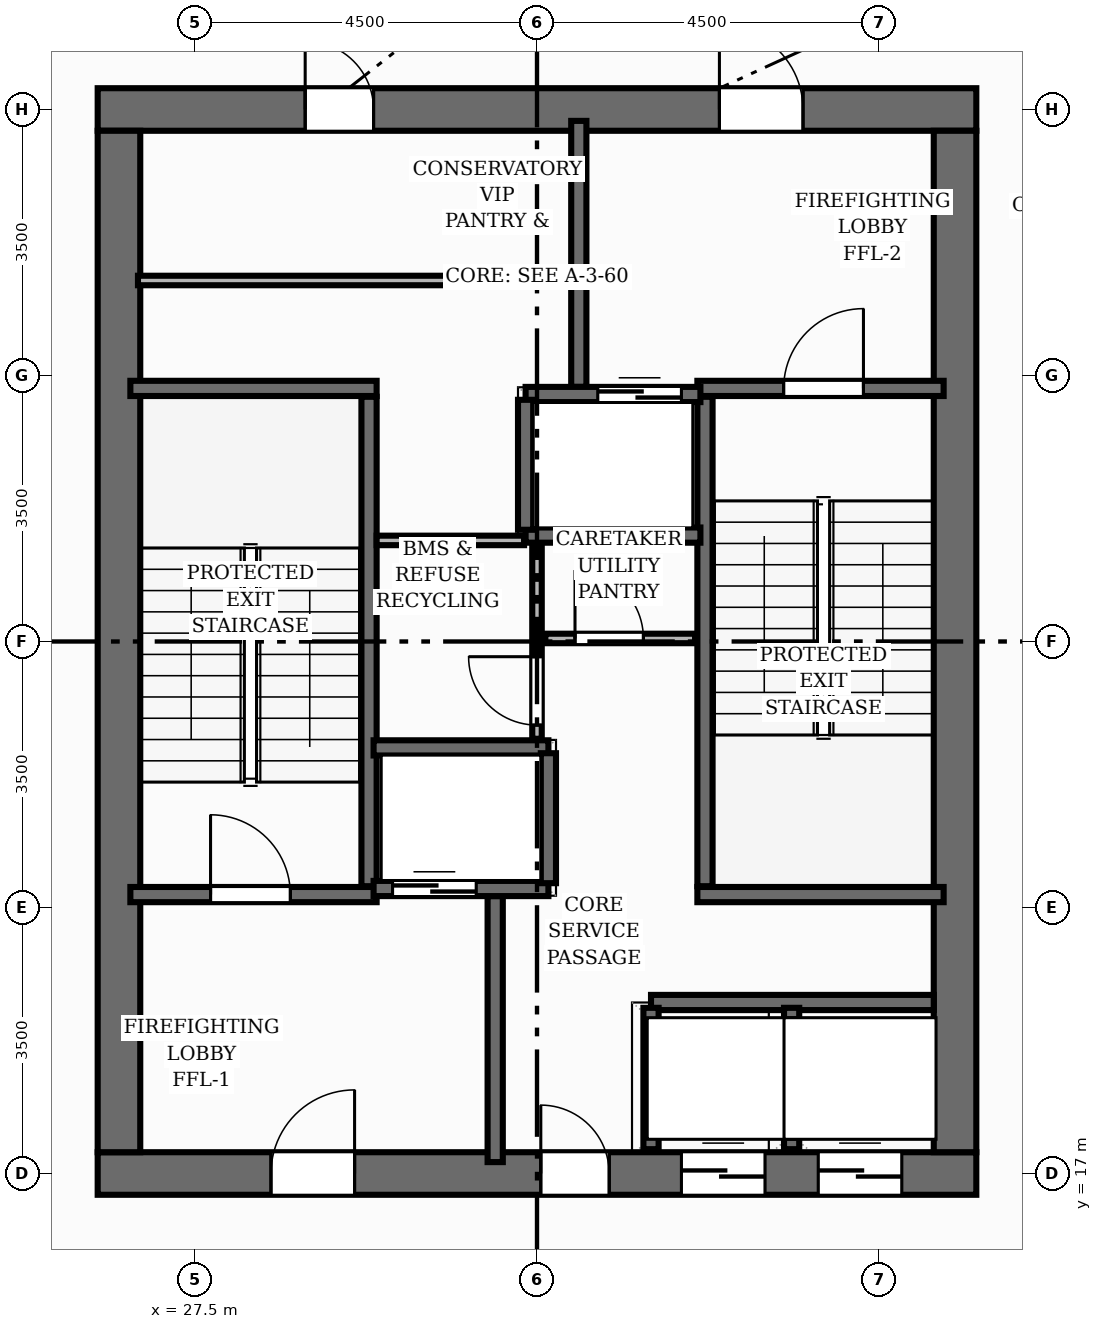
"""IFC4 building model, lengths in metres.
Left out: names, types, materials, properties, quantities, classifications, styles, units other than length and angle.
Written with IfcOpenShell. Run it as: python <this file> out.ifc"""

import sys

from ifc_helpers import new_model, si_unit, direction, frame, frame_2d, origin, place, context, subcontext, project, spatial, rectangle, extrude, element, fill, save


model = new_model("IFC4")
c1 = context("Model", 3, precision=1e-05, world=origin(), true_north=direction((0.0, 1.0)))
c2 = subcontext(c1, "Body", "Model", "MODEL_VIEW")
j1 = project(units=[si_unit("LENGTHUNIT", "METRE"), si_unit("PLANEANGLEUNIT", "RADIAN")], contexts=[c1])
p1 = place(None, origin())
s1 = spatial("IfcSite", under=j1, at=p1, CompositionType="ELEMENT")
p2 = place(p1, origin())
s2 = spatial("IfcBuilding", under=s1, at=p2, CompositionType="ELEMENT")
p3 = place(p2, frame((0.0, 0.0, 246.88)))
s3 = spatial("IfcBuildingStorey", under=s2, at=p3, CompositionType="ELEMENT", Elevation=246.88)
p4 = place(p3, frame((26.22, 17.0, 0.0), z_axis=(0.0, 0.0, 1.0), x_axis=(1.0, 0.0, 0.0)))
e1 = element("IfcWall", 1, at=p4, inside=s3, PredefinedType="SHEAR", context=c2, shape_type="SweptSolid", body=[
    extrude(rectangle(XDim=11.56, YDim=0.56, at=frame_2d((5.78, 0.0))), origin(), (0.0, 0.0, 1.0), 4.16),
])
p5 = place(p4, frame((2.28, 0.0, 0.0)))
e2 = element("IfcOpeningElement", 2, at=p5, cuts=e1, PredefinedType="OPENING", context=c2, shape_type="SweptSolid", body=[
    extrude(rectangle(XDim=1.1, YDim=2.15, at=frame_2d((0.55, 1.075))), frame((0.0, 0.29, 0.0), z_axis=(0.0, -1.0, 0.0), x_axis=(1.0, 0.0, 0.0)), (0.0, 0.0, 1.0), 0.58),
])
p6 = place(p4, frame((7.68, 0.0, 0.0)))
e3 = element("IfcOpeningElement", 3, at=p6, cuts=e1, PredefinedType="OPENING", context=c2, shape_type="SweptSolid", body=[
    extrude(rectangle(XDim=1.1, YDim=2.15, at=frame_2d((0.55, 1.075))), frame((0.0, 0.29, 0.0), z_axis=(0.0, -1.0, 0.0), x_axis=(1.0, 0.0, 0.0)), (0.0, 0.0, 1.0), 0.58),
])
p7 = place(p4, frame((9.48, 0.0, 0.0)))
e4 = element("IfcOpeningElement", 4, at=p7, cuts=e1, PredefinedType="OPENING", context=c2, shape_type="SweptSolid", body=[
    extrude(rectangle(XDim=1.1, YDim=2.15, at=frame_2d((0.55, 1.075))), frame((0.0, 0.29, 0.0), z_axis=(0.0, -1.0, 0.0), x_axis=(1.0, 0.0, 0.0)), (0.0, 0.0, 1.0), 0.58),
])
p8 = place(p4, frame((5.83, 0.0, 0.0)))
e5 = element("IfcOpeningElement", 5, at=p8, cuts=e1, PredefinedType="OPENING", context=c2, shape_type="SweptSolid", body=[
    extrude(rectangle(XDim=0.9, YDim=2.1, at=frame_2d((0.45, 1.05))), frame((0.0, 0.29, 0.0), z_axis=(0.0, -1.0, 0.0), x_axis=(1.0, 0.0, 0.0)), (0.0, 0.0, 1.0), 0.58),
])
p9 = place(p3, frame((26.22, 31.0, 0.0), z_axis=(0.0, 0.0, 1.0), x_axis=(1.0, 0.0, 0.0)))
e6 = element("IfcWall", 6, at=p9, inside=s3, PredefinedType="SHEAR", context=c2, shape_type="SweptSolid", body=[
    extrude(rectangle(XDim=11.56, YDim=0.56, at=frame_2d((5.78, 0.0))), origin(), (0.0, 0.0, 1.0), 4.16),
])
p10 = place(p9, frame((8.18, 0.0, 0.0)))
e7 = element("IfcOpeningElement", 7, at=p10, cuts=e6, PredefinedType="OPENING", context=c2, shape_type="SweptSolid", body=[
    extrude(rectangle(XDim=1.1, YDim=2.0, at=frame_2d((0.55, 1.0))), frame((0.0, 0.29, 0.0), z_axis=(0.0, -1.0, 0.0), x_axis=(1.0, 0.0, 0.0)), (0.0, 0.0, 1.0), 0.58),
])
p11 = place(p9, frame((2.73, 0.0, 0.0)))
e8 = element("IfcOpeningElement", 8, at=p11, cuts=e6, PredefinedType="OPENING", context=c2, shape_type="SweptSolid", body=[
    extrude(rectangle(XDim=0.9, YDim=2.1, at=frame_2d((0.45, 1.05))), frame((0.0, 0.29, 0.0), z_axis=(0.0, -1.0, 0.0), x_axis=(1.0, 0.0, 0.0)), (0.0, 0.0, 1.0), 0.58),
])
for number, where, z_axis, x_axis in (
    (9, (26.5, 17.28, 0.0), (0.0, 0.0, 1.0), (0.0, 1.0, 0.0)),
    (10, (37.5, 17.28, 0.0), (0.0, 0.0, 1.0), (0.0, 1.0, 0.0)),
):
    element("IfcWall", number, at=place(p3, frame(where, z_axis=z_axis, x_axis=x_axis)), inside=s3, PredefinedType="SHEAR", context=c2, shape_type="SweptSolid", body=[
        extrude(rectangle(XDim=13.44, YDim=0.56, at=frame_2d((6.72, 0.0))), origin(), (0.0, 0.0, 1.0), 4.16),
    ])
p12 = place(p3, frame((29.79, 20.78, 0.0), z_axis=(0.0, 0.0, 1.0), x_axis=(0.0, 1.0, 0.0)))
e11 = element("IfcWall", 11, at=p12, inside=s3, PredefinedType="SHEAR", context=c2, shape_type="SweptSolid", body=[
    extrude(rectangle(XDim=6.44, YDim=0.2, at=frame_2d((3.22, 0.0))), origin(), (0.0, 0.0, 1.0), 4.16),
])
p13 = place(p3, frame((26.65, 27.33, 0.0), z_axis=(0.0, 0.0, 1.0), x_axis=(1.0, 0.0, 0.0)))
e12 = element("IfcWall", 12, at=p13, inside=s3, PredefinedType="SHEAR", context=c2, shape_type="SweptSolid", body=[
    extrude(rectangle(XDim=3.24, YDim=0.2, at=frame_2d((1.62, 0.0))), origin(), (0.0, 0.0, 1.0), 4.16),
])
p14 = place(p3, frame((26.65, 20.67, 0.0), z_axis=(0.0, 0.0, 1.0), x_axis=(1.0, 0.0, 0.0)))
e13 = element("IfcWall", 13, at=p14, inside=s3, PredefinedType="SHEAR", context=c2, shape_type="SweptSolid", body=[
    extrude(rectangle(XDim=3.24, YDim=0.2, at=frame_2d((1.62, 0.0))), origin(), (0.0, 0.0, 1.0), 4.16),
])
p15 = place(p14, frame((1.055, 0.0, 0.0)))
e14 = element("IfcOpeningElement", 14, at=p15, cuts=e13, PredefinedType="OPENING", context=c2, shape_type="SweptSolid", body=[
    extrude(rectangle(XDim=1.05, YDim=2.15, at=frame_2d((0.525, 1.075))), frame((0.0, 0.11, 0.0), z_axis=(0.0, -1.0, 0.0), x_axis=(1.0, 0.0, 0.0)), (0.0, 0.0, 1.0), 0.22),
])
p16 = place(p3, frame((34.21, 20.78, 0.0), z_axis=(0.0, 0.0, 1.0), x_axis=(0.0, 1.0, 0.0)))
e15 = element("IfcWall", 15, at=p16, inside=s3, PredefinedType="SHEAR", context=c2, shape_type="SweptSolid", body=[
    extrude(rectangle(XDim=6.44, YDim=0.2, at=frame_2d((3.22, 0.0))), origin(), (0.0, 0.0, 1.0), 4.16),
])
p17 = place(p3, frame((34.11, 20.67, 0.0), z_axis=(0.0, 0.0, 1.0), x_axis=(1.0, 0.0, 0.0)))
e16 = element("IfcWall", 16, at=p17, inside=s3, PredefinedType="SHEAR", context=c2, shape_type="SweptSolid", body=[
    extrude(rectangle(XDim=3.24, YDim=0.2, at=frame_2d((1.62, 0.0))), origin(), (0.0, 0.0, 1.0), 4.16),
])
p18 = place(p3, frame((34.11, 27.33, 0.0), z_axis=(0.0, 0.0, 1.0), x_axis=(1.0, 0.0, 0.0)))
e17 = element("IfcWall", 17, at=p18, inside=s3, PredefinedType="SHEAR", context=c2, shape_type="SweptSolid", body=[
    extrude(rectangle(XDim=3.24, YDim=0.2, at=frame_2d((1.62, 0.0))), origin(), (0.0, 0.0, 1.0), 4.16),
])
p19 = place(p18, frame((1.135, 0.0, 0.0)))
e18 = element("IfcOpeningElement", 18, at=p19, cuts=e17, PredefinedType="OPENING", context=c2, shape_type="SweptSolid", body=[
    extrude(rectangle(XDim=1.05, YDim=2.15, at=frame_2d((0.525, 1.075))), frame((0.0, 0.11, 0.0), z_axis=(0.0, -1.0, 0.0), x_axis=(1.0, 0.0, 0.0)), (0.0, 0.0, 1.0), 0.22),
])
for number, where, z_axis, x_axis in (
    (19, (31.45, 17.15, 0.0), (0.0, 0.0, 1.0), (0.0, 1.0, 0.0)),
    (20, (32.55, 27.35, 0.0), (0.0, 0.0, 1.0), (0.0, 1.0, 0.0)),
):
    element("IfcWall", number, at=place(p3, frame(where, z_axis=z_axis, x_axis=x_axis)), inside=s3, PredefinedType="SHEAR", context=c2, shape_type="SweptSolid", body=[
        extrude(rectangle(XDim=3.5, YDim=0.2, at=frame_2d((1.75, 0.0))), origin(), (0.0, 0.0, 1.0), 4.16),
    ])
p20 = place(p3, frame((29.85, 20.75, 0.0), z_axis=(0.0, 0.0, 1.0), x_axis=(1.0, 0.0, 0.0)))
e21 = element("IfcWall", 21, at=p20, inside=s3, PredefinedType="SHEAR", context=c2, shape_type="SweptSolid", body=[
    extrude(rectangle(XDim=2.3, YDim=0.2, at=frame_2d((1.15, 0.0))), origin(), (0.0, 0.0, 1.0), 4.16),
])
p21 = place(p20, frame((0.25, 0.0, 0.0)))
e22 = element("IfcOpeningElement", 22, at=p21, cuts=e21, PredefinedType="OPENING", context=c2, shape_type="SweptSolid", body=[
    extrude(rectangle(XDim=1.1, YDim=2.15, at=frame_2d((0.55, 1.075))), frame((0.0, 0.11, 0.0), z_axis=(0.0, -1.0, 0.0), x_axis=(1.0, 0.0, 0.0)), (0.0, 0.0, 1.0), 0.22),
])
p22 = place(p3, frame((29.85, 22.6, 0.0), z_axis=(0.0, 0.0, 1.0), x_axis=(1.0, 0.0, 0.0)))
e23 = element("IfcWall", 23, at=p22, inside=s3, PredefinedType="SHEAR", context=c2, shape_type="SweptSolid", body=[
    extrude(rectangle(XDim=2.3, YDim=0.2, at=frame_2d((1.15, 0.0))), origin(), (0.0, 0.0, 1.0), 4.16),
])
p23 = place(p3, frame((32.15, 20.82, 0.0), z_axis=(0.0, 0.0, 1.0), x_axis=(0.0, 1.0, 0.0)))
e24 = element("IfcWall", 24, at=p23, inside=s3, PredefinedType="SHEAR", context=c2, shape_type="SweptSolid", body=[
    extrude(rectangle(XDim=1.71, YDim=0.2, at=frame_2d((0.855, 0.0))), origin(), (0.0, 0.0, 1.0), 4.16),
])
p24 = place(p3, frame((31.85, 27.25, 0.0), z_axis=(0.0, 0.0, 1.0), x_axis=(1.0, 0.0, 0.0)))
e25 = element("IfcWall", 25, at=p24, inside=s3, PredefinedType="SHEAR", context=c2, shape_type="SweptSolid", body=[
    extrude(rectangle(XDim=2.3, YDim=0.2, at=frame_2d((1.15, 0.0))), origin(), (0.0, 0.0, 1.0), 4.16),
])
p25 = place(p24, frame((0.95, 0.0, 0.0)))
e26 = element("IfcOpeningElement", 26, at=p25, cuts=e25, PredefinedType="OPENING", context=c2, shape_type="SweptSolid", body=[
    extrude(rectangle(XDim=1.1, YDim=2.15, at=frame_2d((0.55, 1.075))), frame((0.0, 0.11, 0.0), z_axis=(0.0, -1.0, 0.0), x_axis=(1.0, 0.0, 0.0)), (0.0, 0.0, 1.0), 0.22),
])
p26 = place(p3, frame((31.85, 25.4, 0.0), z_axis=(0.0, 0.0, 1.0), x_axis=(1.0, 0.0, 0.0)))
e27 = element("IfcWall", 27, at=p26, inside=s3, PredefinedType="SHEAR", context=c2, shape_type="SweptSolid", body=[
    extrude(rectangle(XDim=2.3, YDim=0.2, at=frame_2d((1.15, 0.0))), origin(), (0.0, 0.0, 1.0), 4.16),
])
p27 = place(p3, frame((31.85, 25.47, 0.0), z_axis=(0.0, 0.0, 1.0), x_axis=(0.0, 1.0, 0.0)))
e28 = element("IfcWall", 28, at=p27, inside=s3, PredefinedType="SHEAR", context=c2, shape_type="SweptSolid", body=[
    extrude(rectangle(XDim=1.71, YDim=0.2, at=frame_2d((0.855, 0.0))), origin(), (0.0, 0.0, 1.0), 4.16),
])
p28 = place(p3, frame((26.75, 28.75, 0.0), z_axis=(0.0, 0.0, 1.0), x_axis=(1.0, 0.0, 0.0)))
e29 = element("IfcWall", 29, at=p28, inside=s3, PredefinedType="PARTITIONING", context=c2, shape_type="SweptSolid", body=[
    extrude(rectangle(XDim=5.75, YDim=0.125, at=frame_2d((2.875, 0.0))), origin(), (0.0, 0.0, 1.0), 3.835),
])
p29 = place(p3, frame((33.5, 19.25, 0.0), z_axis=(0.0, 0.0, 1.0), x_axis=(1.0, 0.0, 0.0)))
e30 = element("IfcWall", 30, at=p29, inside=s3, PredefinedType="SHEAR", context=c2, shape_type="SweptSolid", body=[
    extrude(rectangle(XDim=3.72, YDim=0.2, at=frame_2d((1.86, 0.0))), origin(), (0.0, 0.0, 1.0), 4.16),
])
for number, where, z_axis, x_axis in (
    (31, (33.5, 17.32, 0.0), (0.0, 0.0, 1.0), (0.0, 1.0, 0.0)),
    (32, (35.35, 17.32, 0.0), (0.0, 0.0, 1.0), (0.0, 1.0, 0.0)),
):
    element("IfcWall", number, at=place(p3, frame(where, z_axis=z_axis, x_axis=x_axis)), inside=s3, PredefinedType="SHEAR", context=c2, shape_type="SweptSolid", body=[
        extrude(rectangle(XDim=1.86, YDim=0.2, at=frame_2d((0.93, 0.0))), origin(), (0.0, 0.0, 1.0), 4.16),
    ])
p30 = place(p3, frame((32.0, 22.72, 0.0), z_axis=(0.0, 0.0, 1.0), x_axis=(0.0, 1.0, 0.0)))
e33 = element("IfcWall", 33, at=p30, inside=s3, PredefinedType="PARTITIONING", context=c2, shape_type="SweptSolid", body=[
    extrude(rectangle(XDim=2.52, YDim=0.125, at=frame_2d((1.26, 0.0))), origin(), (0.0, 0.0, 1.0), 3.835),
])
p31 = place(p30, frame((0.18, 0.0, 0.0)))
e34 = element("IfcOpeningElement", 34, at=p31, cuts=e33, PredefinedType="OPENING", context=c2, shape_type="SweptSolid", body=[
    extrude(rectangle(XDim=0.9, YDim=2.1, at=frame_2d((0.45, 1.05))), frame((0.0, 0.073, 0.0), z_axis=(0.0, -1.0, 0.0), x_axis=(1.0, 0.0, 0.0)), (0.0, 0.0, 1.0), 0.145),
])
p32 = place(p3, frame((32.11, 24.04, 0.0), z_axis=(0.0, 0.0, 1.0), x_axis=(1.0, 0.0, 0.0)))
e35 = element("IfcWall", 35, at=p32, inside=s3, PredefinedType="PARTITIONING", context=c2, shape_type="SweptSolid", body=[
    extrude(rectangle(XDim=1.97, YDim=0.125, at=frame_2d((0.985, 0.0))), origin(), (0.0, 0.0, 1.0), 3.835),
])
p33 = place(p32, frame((0.39, 0.0, 0.0)))
e36 = element("IfcOpeningElement", 36, at=p33, cuts=e35, PredefinedType="OPENING", context=c2, shape_type="SweptSolid", body=[
    extrude(rectangle(XDim=0.9, YDim=2.1, at=frame_2d((0.45, 1.05))), frame((0.0, 0.073, 0.0), z_axis=(0.0, -1.0, 0.0), x_axis=(1.0, 0.0, 0.0)), (0.0, 0.0, 1.0), 0.145),
])
p34 = place(p3, frame((29.89, 25.33, 0.0), z_axis=(0.0, 0.0, 1.0), x_axis=(1.0, 0.0, 0.0)))
e37 = element("IfcWall", 37, at=p34, inside=s3, PredefinedType="PARTITIONING", context=c2, shape_type="SweptSolid", body=[
    extrude(rectangle(XDim=1.94, YDim=0.125, at=frame_2d((0.97, 0.0))), origin(), (0.0, 0.0, 1.0), 3.835),
])
p35 = place(p15, origin())
e38 = element("IfcDoor", 38, at=p35, inside=s3, OperationType="SINGLE_SWING_LEFT", PredefinedType="DOOR", context=c2, shape_type="SweptSolid", body=[
    extrude(rectangle(XDim=1.05, YDim=2.15, at=frame_2d((0.525, 1.075))), frame((0.0, 0.025, 0.0), z_axis=(0.0, -1.0, 0.0), x_axis=(1.0, 0.0, 0.0)), (0.0, 0.0, 1.0), 0.05),
])
fill(e14, e38)
p36 = place(p19, origin())
e39 = element("IfcDoor", 39, at=p36, inside=s3, OperationType="SINGLE_SWING_RIGHT", PredefinedType="DOOR", context=c2, shape_type="SweptSolid", body=[
    extrude(rectangle(XDim=1.05, YDim=2.15, at=frame_2d((0.525, 1.075))), frame((0.0, 0.025, 0.0), z_axis=(0.0, -1.0, 0.0), x_axis=(1.0, 0.0, 0.0)), (0.0, 0.0, 1.0), 0.05),
])
fill(e18, e39)
p37 = place(p5, origin())
e40 = element("IfcDoor", 40, at=p37, inside=s3, OperationType="SINGLE_SWING_RIGHT", PredefinedType="DOOR", context=c2, shape_type="SweptSolid", body=[
    extrude(rectangle(XDim=1.1, YDim=2.15, at=frame_2d((0.55, 1.075))), frame((0.0, 0.025, 0.0), z_axis=(0.0, -1.0, 0.0), x_axis=(1.0, 0.0, 0.0)), (0.0, 0.0, 1.0), 0.05),
])
fill(e2, e40)
p38 = place(p10, origin())
e41 = element("IfcDoor", 41, at=p38, inside=s3, OperationType="SINGLE_SWING_LEFT", PredefinedType="DOOR", context=c2, shape_type="SweptSolid", body=[
    extrude(rectangle(XDim=1.1, YDim=2.0, at=frame_2d((0.55, 1.0))), frame((0.0, 0.025, 0.0), z_axis=(0.0, -1.0, 0.0), x_axis=(1.0, 0.0, 0.0)), (0.0, 0.0, 1.0), 0.05),
])
fill(e7, e41)
p39 = place(p21, origin())
e42 = element("IfcDoor", 42, at=p39, inside=s3, OperationType="DOUBLE_DOOR_SLIDING", PredefinedType="DOOR", context=c2, shape_type="SweptSolid", body=[
    extrude(rectangle(XDim=1.1, YDim=2.15, at=frame_2d((0.55, 1.075))), frame((0.0, 0.025, 0.0), z_axis=(0.0, -1.0, 0.0), x_axis=(1.0, 0.0, 0.0)), (0.0, 0.0, 1.0), 0.05),
])
fill(e22, e42)
p40 = place(p25, origin())
e43 = element("IfcDoor", 43, at=p40, inside=s3, OperationType="DOUBLE_DOOR_SLIDING", PredefinedType="DOOR", context=c2, shape_type="SweptSolid", body=[
    extrude(rectangle(XDim=1.1, YDim=2.15, at=frame_2d((0.55, 1.075))), frame((0.0, 0.025, 0.0), z_axis=(0.0, -1.0, 0.0), x_axis=(1.0, 0.0, 0.0)), (0.0, 0.0, 1.0), 0.05),
])
fill(e26, e43)
p41 = place(p6, origin())
e44 = element("IfcDoor", 44, at=p41, inside=s3, OperationType="DOUBLE_DOOR_SLIDING", PredefinedType="DOOR", context=c2, shape_type="SweptSolid", body=[
    extrude(rectangle(XDim=1.1, YDim=2.15, at=frame_2d((0.55, 1.075))), frame((0.0, 0.025, 0.0), z_axis=(0.0, -1.0, 0.0), x_axis=(1.0, 0.0, 0.0)), (0.0, 0.0, 1.0), 0.05),
])
fill(e3, e44)
p42 = place(p7, origin())
e45 = element("IfcDoor", 45, at=p42, inside=s3, OperationType="DOUBLE_DOOR_SLIDING", PredefinedType="DOOR", context=c2, shape_type="SweptSolid", body=[
    extrude(rectangle(XDim=1.1, YDim=2.15, at=frame_2d((0.55, 1.075))), frame((0.0, 0.025, 0.0), z_axis=(0.0, -1.0, 0.0), x_axis=(1.0, 0.0, 0.0)), (0.0, 0.0, 1.0), 0.05),
])
fill(e4, e45)
p43 = place(p11, origin())
e46 = element("IfcDoor", 46, at=p43, inside=s3, OperationType="SINGLE_SWING_LEFT", PredefinedType="DOOR", context=c2, shape_type="SweptSolid", body=[
    extrude(rectangle(XDim=0.9, YDim=2.1, at=frame_2d((0.45, 1.05))), frame((0.0, 0.025, 0.0), z_axis=(0.0, -1.0, 0.0), x_axis=(1.0, 0.0, 0.0)), (0.0, 0.0, 1.0), 0.05),
])
fill(e8, e46)
p44 = place(p8, origin())
e47 = element("IfcDoor", 47, at=p44, inside=s3, OperationType="SINGLE_SWING_LEFT", PredefinedType="DOOR", context=c2, shape_type="SweptSolid", body=[
    extrude(rectangle(XDim=0.9, YDim=2.1, at=frame_2d((0.45, 1.05))), frame((0.0, 0.025, 0.0), z_axis=(0.0, -1.0, 0.0), x_axis=(1.0, 0.0, 0.0)), (0.0, 0.0, 1.0), 0.05),
])
fill(e5, e47)
p45 = place(p33, origin())
e48 = element("IfcDoor", 48, at=p45, inside=s3, OperationType="SINGLE_SWING_LEFT", PredefinedType="DOOR", context=c2, shape_type="SweptSolid", body=[
    extrude(rectangle(XDim=0.9, YDim=2.1, at=frame_2d((0.45, 1.05))), frame((0.0, 0.025, 0.0), z_axis=(0.0, -1.0, 0.0), x_axis=(1.0, 0.0, 0.0)), (0.0, 0.0, 1.0), 0.05),
])
fill(e36, e48)
p46 = place(p31, origin())
e49 = element("IfcDoor", 49, at=p46, inside=s3, OperationType="SINGLE_SWING_RIGHT", PredefinedType="DOOR", context=c2, shape_type="SweptSolid", body=[
    extrude(rectangle(XDim=0.9, YDim=2.1, at=frame_2d((0.45, 1.05))), frame((0.0, 0.025, 0.0), z_axis=(0.0, -1.0, 0.0), x_axis=(1.0, 0.0, 0.0)), (0.0, 0.0, 1.0), 0.05),
])
fill(e34, e49)
save(model, sys.argv[1])
